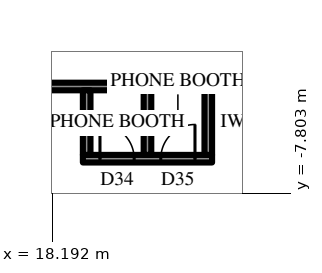
"""IFC4 building model, lengths in metres.
Left out: names, types, materials, properties, quantities, classifications, styles, units other than length and angle.
Written with IfcOpenShell. Run it as: python <this file> out.ifc"""

import sys

from ifc_helpers import new_model, si_unit, direction, frame, frame_2d, origin, place, context, subcontext, project, spatial, rectangle, extrude, element, fill, save


model = new_model("IFC4")
c1 = context("Model", 3, precision=1e-05, world=origin(), true_north=direction((0.0, 1.0)))
c2 = subcontext(c1, "Body", "Model", "MODEL_VIEW")
j1 = project(units=[si_unit("LENGTHUNIT", "METRE"), si_unit("PLANEANGLEUNIT", "RADIAN")], contexts=[c1])
p1 = place(None, origin())
s1 = spatial("IfcSite", under=j1, at=p1, CompositionType="ELEMENT")
p2 = place(p1, origin())
s2 = spatial("IfcBuilding", under=s1, at=p2, CompositionType="ELEMENT")
p3 = place(p2, frame((0.0, 0.0, 282.7)))
s3 = spatial("IfcBuildingStorey", under=s2, at=p3, CompositionType="ELEMENT", Elevation=282.7)
p4 = place(p3, frame((18.707, -25.299, 0.0), z_axis=(0.0, 0.0, 1.0), x_axis=(0.500000442367, 0.866025148383, 0.0)))
e1 = element("IfcWall", 1, at=p4, inside=s3, PredefinedType="SOLIDWALL", context=c2, shape_type="SweptSolid", body=[
    extrude(rectangle(XDim=25.113, YDim=0.3, at=frame_2d((12.556, 0.0))), origin(), (0.0, 0.0, 1.0), 2.8),
])
p5 = place(p4, frame((4.278, 0.0, 0.6)))
e2 = element("IfcOpeningElement", 2, at=p5, cuts=e1, PredefinedType="OPENING", context=c2, shape_type="SweptSolid", body=[
    extrude(rectangle(XDim=2.7, YDim=1.95, at=frame_2d((1.35, 0.975))), frame((0.0, 0.16, 0.0), z_axis=(0.0, -1.0, 0.0), x_axis=(1.0, 0.0, 0.0)), (0.0, 0.0, 1.0), 0.32),
])
p6 = place(p4, frame((9.647, 0.0, 0.0)))
e3 = element("IfcOpeningElement", 3, at=p6, cuts=e1, PredefinedType="OPENING", context=c2, shape_type="SweptSolid", body=[
    extrude(rectangle(XDim=1.2, YDim=2.4, at=frame_2d((0.6, 1.2))), frame((0.0, 0.16, 0.0), z_axis=(0.0, -1.0, 0.0), x_axis=(1.0, 0.0, 0.0)), (0.0, 0.0, 1.0), 0.32),
])
p7 = place(p4, frame((13.516, 0.0, 0.6)))
e4 = element("IfcOpeningElement", 4, at=p7, cuts=e1, PredefinedType="OPENING", context=c2, shape_type="SweptSolid", body=[
    extrude(rectangle(XDim=2.7, YDim=1.95, at=frame_2d((1.35, 0.975))), frame((0.0, 0.16, 0.0), z_axis=(0.0, -1.0, 0.0), x_axis=(1.0, 0.0, 0.0)), (0.0, 0.0, 1.0), 0.32),
])
p8 = place(p4, frame((18.135, 0.0, 0.6)))
e5 = element("IfcOpeningElement", 5, at=p8, cuts=e1, PredefinedType="OPENING", context=c2, shape_type="SweptSolid", body=[
    extrude(rectangle(XDim=2.7, YDim=1.95, at=frame_2d((1.35, 0.975))), frame((0.0, 0.16, 0.0), z_axis=(0.0, -1.0, 0.0), x_axis=(1.0, 0.0, 0.0)), (0.0, 0.0, 1.0), 0.32),
])
p9 = place(p3, frame((15.5, -5.0, 0.0), z_axis=(0.0, 0.0, 1.0), x_axis=(1.0, 0.0, 0.0)))
e6 = element("IfcWall", 6, at=p9, inside=s3, PredefinedType="PARTITIONING", context=c2, shape_type="SweptSolid", body=[
    extrude(rectangle(XDim=14.845, YDim=0.2, at=frame_2d((7.423, 0.0))), origin(), (0.0, 0.0, 1.0), 4.0),
])
p10 = place(p9, frame((0.985, 0.0, 0.0)))
e7 = element("IfcOpeningElement", 7, at=p10, cuts=e6, PredefinedType="OPENING", context=c2, shape_type="SweptSolid", body=[
    extrude(rectangle(XDim=1.0, YDim=2.2, at=frame_2d((0.5, 1.1))), frame((0.0, 0.11, 0.0), z_axis=(0.0, -1.0, 0.0), x_axis=(1.0, 0.0, 0.0)), (0.0, 0.0, 1.0), 0.22),
])
p11 = place(p3, frame((18.996, -6.9, 0.0), z_axis=(0.0, 0.0, 1.0), x_axis=(1.0, 0.0, 0.0)))
e8 = element("IfcWall", 8, at=p11, inside=s3, PredefinedType="PARTITIONING", context=c2, shape_type="SweptSolid", body=[
    extrude(rectangle(XDim=3.4, YDim=0.2, at=frame_2d((1.7, 0.0))), origin(), (0.0, 0.0, 1.0), 4.0),
])
p12 = place(p11, frame((0.45, 0.0, 0.0)))
e9 = element("IfcOpeningElement", 9, at=p12, cuts=e8, PredefinedType="OPENING", context=c2, shape_type="SweptSolid", body=[
    extrude(rectangle(XDim=0.9, YDim=2.2, at=frame_2d((0.45, 1.1))), frame((0.0, 0.11, 0.0), z_axis=(0.0, -1.0, 0.0), x_axis=(1.0, 0.0, 0.0)), (0.0, 0.0, 1.0), 0.22),
])
p13 = place(p11, frame((2.05, 0.0, 0.0)))
e10 = element("IfcOpeningElement", 10, at=p13, cuts=e8, PredefinedType="OPENING", context=c2, shape_type="SweptSolid", body=[
    extrude(rectangle(XDim=0.9, YDim=2.2, at=frame_2d((0.45, 1.1))), frame((0.0, 0.11, 0.0), z_axis=(0.0, -1.0, 0.0), x_axis=(1.0, 0.0, 0.0)), (0.0, 0.0, 1.0), 0.22),
])
for number, where, z_axis, x_axis in (
    (11, (19.096, -5.1, 0.0), (0.0, 0.0, 1.0), (0.0, -1.0, 0.0)),
    (12, (20.696, -5.1, 0.0), (0.0, 0.0, 1.0), (0.0, -1.0, 0.0)),
    (13, (22.296, -5.1, 0.0), (0.0, 0.0, 1.0), (0.0, -1.0, 0.0)),
):
    element("IfcWall", number, at=place(p3, frame(where, z_axis=z_axis, x_axis=x_axis)), inside=s3, PredefinedType="PARTITIONING", context=c2, shape_type="SweptSolid", body=[
        extrude(rectangle(XDim=1.7, YDim=0.2, at=frame_2d((0.85, 0.0))), origin(), (0.0, 0.0, 1.0), 4.0),
    ])
p14 = place(p12, origin())
e14 = element("IfcDoor", 14, at=p14, inside=s3, OperationType="SINGLE_SWING_RIGHT", PredefinedType="DOOR", context=c2, shape_type="SweptSolid", body=[
    extrude(rectangle(XDim=0.9, YDim=2.2, at=frame_2d((0.45, 1.1))), frame((0.0, 0.025, 0.0), z_axis=(0.0, -1.0, 0.0), x_axis=(1.0, 0.0, 0.0)), (0.0, 0.0, 1.0), 0.05),
])
fill(e9, e14)
p15 = place(p13, origin())
e15 = element("IfcDoor", 15, at=p15, inside=s3, OperationType="SINGLE_SWING_LEFT", PredefinedType="DOOR", context=c2, shape_type="SweptSolid", body=[
    extrude(rectangle(XDim=0.9, YDim=2.2, at=frame_2d((0.45, 1.1))), frame((0.0, 0.025, 0.0), z_axis=(0.0, -1.0, 0.0), x_axis=(1.0, 0.0, 0.0)), (0.0, 0.0, 1.0), 0.05),
])
fill(e10, e15)
save(model, sys.argv[1])
